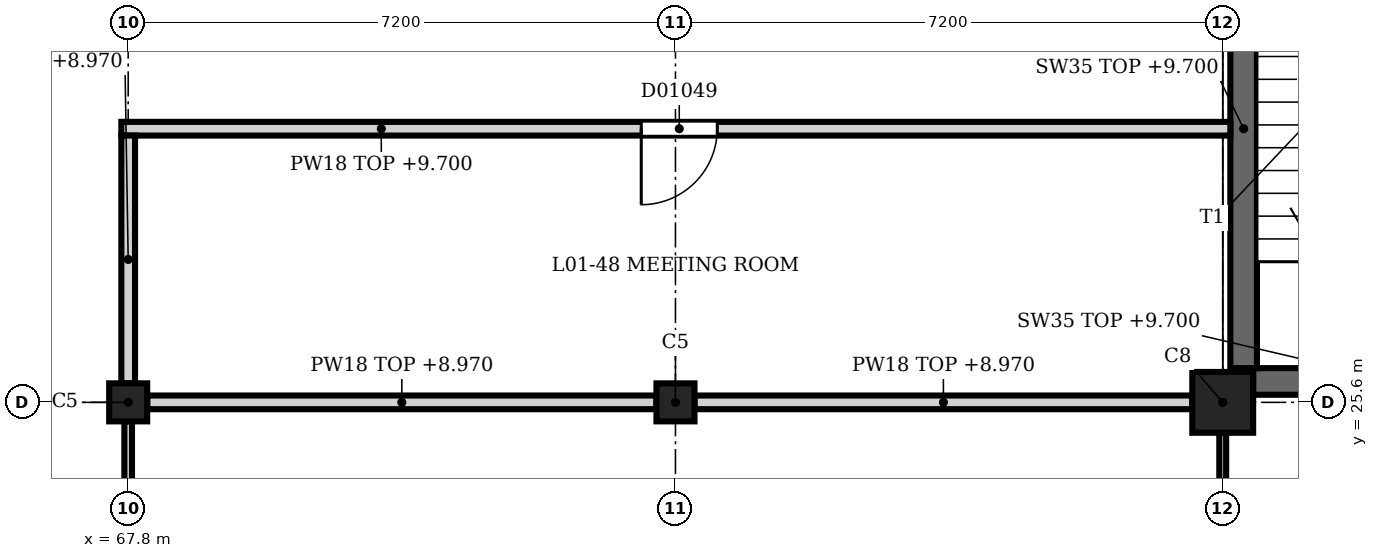
"""IFC4 building model, lengths in metres.
Left out: names, types, materials, properties, quantities, classifications, styles, units other than length and angle.
Written with IfcOpenShell. Run it as: python <this file> out.ifc"""

import sys

from ifc_helpers import new_model, si_unit, direction, frame, frame_2d, origin, origin_2d, place, context, subcontext, project, spatial, rectangle, extrude, element, fill, save


model = new_model("IFC4")
c1 = context("Model", 3, precision=1e-05, world=origin(), true_north=direction((0.0, 1.0)))
c2 = subcontext(c1, "Body", "Model", "MODEL_VIEW")
j1 = project(units=[si_unit("LENGTHUNIT", "METRE"), si_unit("PLANEANGLEUNIT", "RADIAN")], contexts=[c1])
p1 = place(None, origin())
s1 = spatial("IfcSite", under=j1, at=p1, CompositionType="ELEMENT")
p2 = place(p1, origin())
s2 = spatial("IfcBuilding", under=s1, at=p2, CompositionType="ELEMENT")
p3 = place(p2, frame((0.0, 0.0, 5.4)))
s3 = spatial("IfcBuildingStorey", under=s2, at=p3, CompositionType="ELEMENT", Elevation=5.4)
p4 = place(p3, frame((82.2, 25.6, 0.0), z_axis=(0.0, 0.0, 1.0), x_axis=(1.0, 0.0, 0.0)))
e1 = element("IfcColumn", 1, at=p4, inside=s3, PredefinedType="COLUMN", context=c2, shape_type="SweptSolid", body=[
    extrude(rectangle(XDim=0.8, YDim=0.8, at=origin_2d()), origin(), (0.0, 0.0, 1.0), 4.5),
])
for number, where, z_axis, x_axis in (
    (2, (67.8, 25.6, 0.0), (0.0, 0.0, 1.0), (1.0, 0.0, 0.0)),
    (3, (75.0, 25.6, 0.0), (0.0, 0.0, 1.0), (1.0, 0.0, 0.0)),
):
    element("IfcColumn", number, at=place(p3, frame(where, z_axis=z_axis, x_axis=x_axis)), inside=s3, PredefinedType="COLUMN", context=c2, shape_type="SweptSolid", body=[
        extrude(rectangle(XDim=0.5, YDim=0.5, at=origin_2d()), origin(), (0.0, 0.0, 1.0), 4.5),
    ])
p5 = place(p3, frame((82.6, 25.875, 0.0), z_axis=(0.0, 0.0, 1.0), x_axis=(1.0, 0.0, 0.0)))
e4 = element("IfcWall", 4, at=p5, inside=s3, PredefinedType="SHEAR", context=c2, shape_type="SweptSolid", body=[
    extrude(rectangle(XDim=6.4, YDim=0.35, at=frame_2d((3.2, 0.0))), origin(), (0.0, 0.0, 1.0), 4.3),
])
p6 = place(p5, frame((3.8, 0.0, 0.0)))
e5 = element("IfcOpeningElement", 5, at=p6, cuts=e4, PredefinedType="OPENING", context=c2, shape_type="SweptSolid", body=[
    extrude(rectangle(XDim=1.2, YDim=2.1, at=frame_2d((0.6, 1.05))), frame((0.0, 0.185, 0.0), z_axis=(0.0, -1.0, 0.0), x_axis=(1.0, 0.0, 0.0)), (0.0, 0.0, 1.0), 0.37),
])
p7 = place(p3, frame((82.475, 26.05, 0.0), z_axis=(0.0, 0.0, 1.0), x_axis=(0.0, 1.0, 0.0)))
e6 = element("IfcWall", 6, at=p7, inside=s3, PredefinedType="SHEAR", context=c2, shape_type="SweptSolid", body=[
    extrude(rectangle(XDim=6.3, YDim=0.35, at=frame_2d((3.15, 0.0))), origin(), (0.0, 0.0, 1.0), 4.3),
])
p8 = place(p3, frame((68.05, 25.6, 0.0), z_axis=(0.0, 0.0, 1.0), x_axis=(1.0, 0.0, 0.0)))
e7 = element("IfcWall", 7, at=p8, inside=s3, PredefinedType="PARTITIONING", context=c2, shape_type="SweptSolid", body=[
    extrude(rectangle(XDim=6.7, YDim=0.18, at=frame_2d((3.35, 0.0))), origin(), (0.0, 0.0, 1.0), 3.57),
])
p9 = place(p3, frame((75.25, 25.6, 0.0), z_axis=(0.0, 0.0, 1.0), x_axis=(1.0, 0.0, 0.0)))
e8 = element("IfcWall", 8, at=p9, inside=s3, PredefinedType="PARTITIONING", context=c2, shape_type="SweptSolid", body=[
    extrude(rectangle(XDim=6.55, YDim=0.18, at=frame_2d((3.275, 0.0))), origin(), (0.0, 0.0, 1.0), 3.57),
])
p10 = place(p3, frame((82.3, 29.2, 0.0), z_axis=(0.0, 0.0, 1.0), x_axis=(-1.0, 0.0, 0.0)))
e9 = element("IfcWall", 9, at=p10, inside=s3, PredefinedType="PARTITIONING", context=c2, shape_type="SweptSolid", body=[
    extrude(rectangle(XDim=14.59, YDim=0.18, at=frame_2d((7.295, 0.0))), origin(), (0.0, 0.0, 1.0), 4.3),
])
p11 = place(p10, frame((6.75, 0.0, 0.0)))
e10 = element("IfcOpeningElement", 10, at=p11, cuts=e9, PredefinedType="OPENING", context=c2, shape_type="SweptSolid", body=[
    extrude(rectangle(XDim=1.0, YDim=2.1, at=frame_2d((0.5, 1.05))), frame((0.0, 0.1, 0.0), z_axis=(0.0, -1.0, 0.0), x_axis=(1.0, 0.0, 0.0)), (0.0, 0.0, 1.0), 0.2),
])
p12 = place(p3, frame((67.8, 25.35, 0.0), z_axis=(0.0, 0.0, 1.0), x_axis=(0.0, -1.0, 0.0)))
e11 = element("IfcWall", 11, at=p12, inside=s3, PredefinedType="PARTITIONING", context=c2, shape_type="SweptSolid", body=[
    extrude(rectangle(XDim=3.26, YDim=0.1, at=frame_2d((1.63, 0.0))), origin(), (0.0, 0.0, 1.0), 3.57),
])
p13 = place(p12, frame((1.1, 0.0, 0.0)))
e12 = element("IfcOpeningElement", 12, at=p13, cuts=e11, PredefinedType="OPENING", context=c2, shape_type="SweptSolid", body=[
    extrude(rectangle(XDim=1.0, YDim=2.1, at=frame_2d((0.5, 1.05))), frame((0.0, 0.06, 0.0), z_axis=(0.0, -1.0, 0.0), x_axis=(1.0, 0.0, 0.0)), (0.0, 0.0, 1.0), 0.12),
])
p14 = place(p3, frame((67.8, 25.85, 0.0), z_axis=(0.0, 0.0, 1.0), x_axis=(0.0, 1.0, 0.0)))
e13 = element("IfcWall", 13, at=p14, inside=s3, PredefinedType="PARTITIONING", context=c2, shape_type="SweptSolid", body=[
    extrude(rectangle(XDim=3.26, YDim=0.18, at=frame_2d((1.63, 0.0))), origin(), (0.0, 0.0, 1.0), 3.57),
])
p15 = place(p3, frame((82.2, 22.045, 0.0), z_axis=(0.0, 0.0, 1.0), x_axis=(0.0, 1.0, 0.0)))
e14 = element("IfcWall", 14, at=p15, inside=s3, PredefinedType="PARTITIONING", context=c2, shape_type="SweptSolid", body=[
    extrude(rectangle(XDim=3.155, YDim=0.09, at=frame_2d((1.578, 0.0))), origin(), (0.0, 0.0, 1.0), 3.47),
])
p16 = place(p11, origin())
e15 = element("IfcDoor", 15, at=p16, inside=s3, OperationType="SINGLE_SWING_LEFT", PredefinedType="DOOR", context=c2, shape_type="SweptSolid", body=[
    extrude(rectangle(XDim=1.0, YDim=2.1, at=frame_2d((0.5, 1.05))), frame((0.0, 0.025, 0.0), z_axis=(0.0, -1.0, 0.0), x_axis=(1.0, 0.0, 0.0)), (0.0, 0.0, 1.0), 0.05),
])
fill(e10, e15)
save(model, sys.argv[1])
